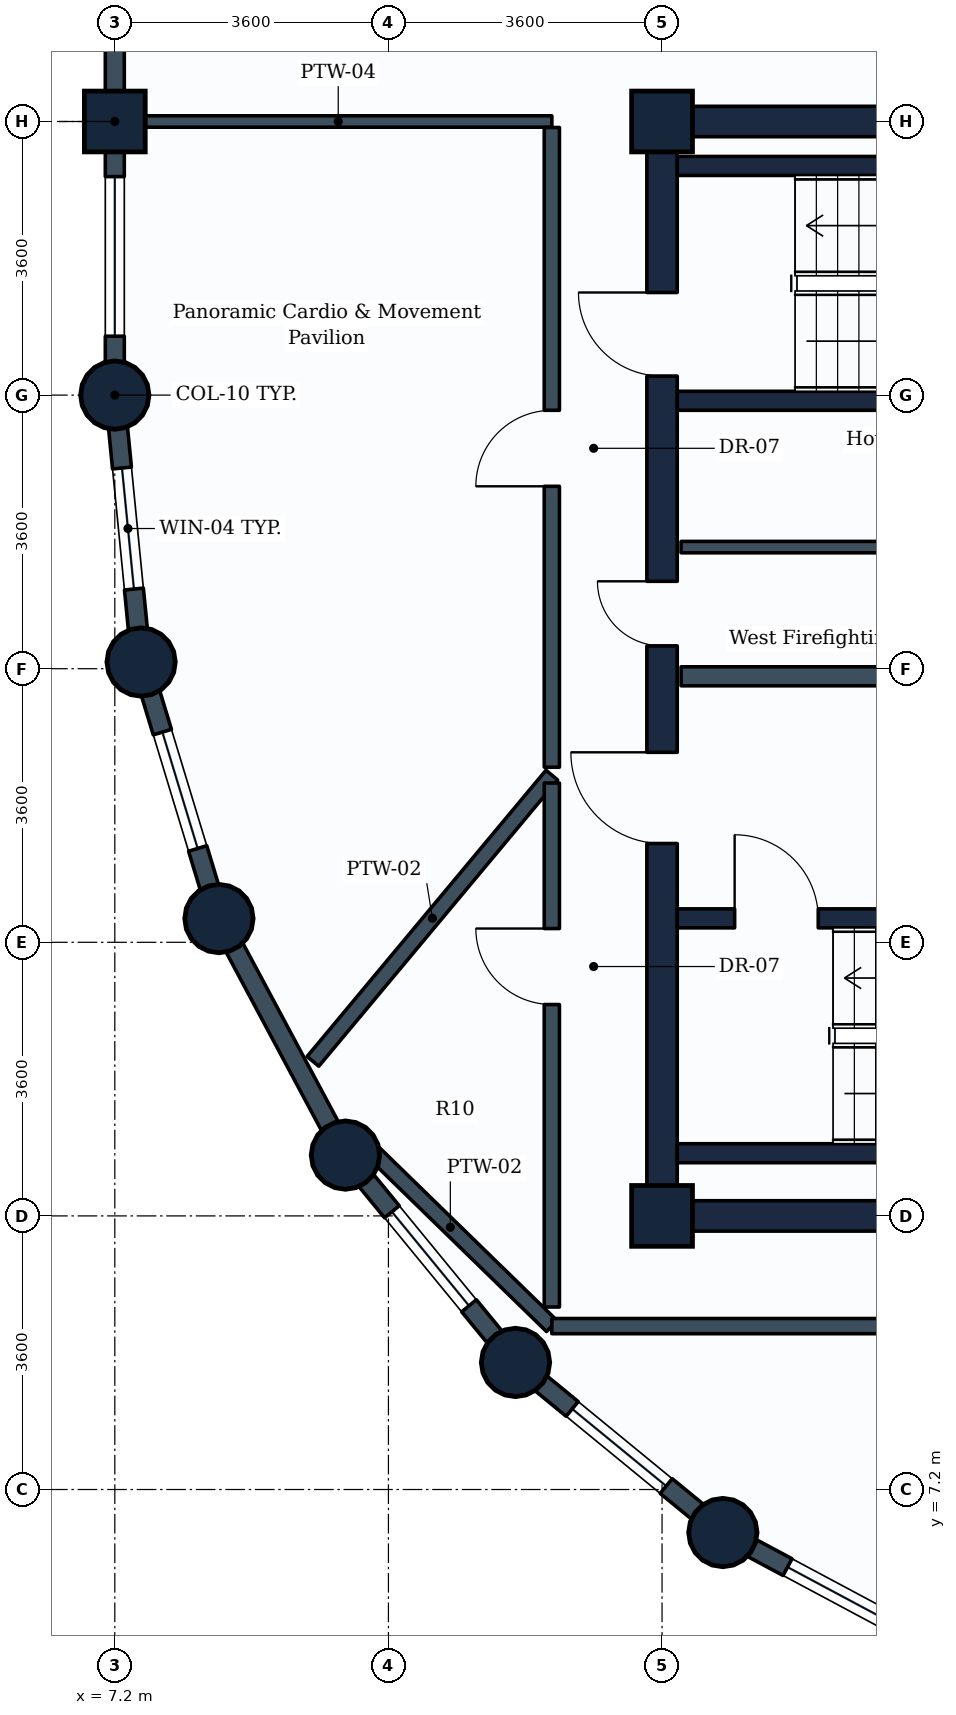
"""IFC4 building model, lengths in metres.
Left out: names, types, materials, properties, quantities, classifications, styles, units other than length and angle.
Written with IfcOpenShell. Run it as: python <this file> out.ifc"""

import sys

from ifc_helpers import new_model, si_unit, direction, frame, frame_2d, origin, origin_2d, place, context, subcontext, project, spatial, rectangle, circle, extrude, element, fill, save


model = new_model("IFC4")
c1 = context("Model", 3, precision=1e-05, world=origin(), true_north=direction((0.0, 1.0)))
c2 = subcontext(c1, "Body", "Model", "MODEL_VIEW")
j1 = project(units=[si_unit("LENGTHUNIT", "METRE"), si_unit("PLANEANGLEUNIT", "RADIAN")], contexts=[c1])
p1 = place(None, origin())
s1 = spatial("IfcSite", under=j1, at=p1, CompositionType="ELEMENT")
p2 = place(p1, origin())
s2 = spatial("IfcBuilding", under=s1, at=p2, CompositionType="ELEMENT")
p3 = place(p2, frame((0.0, 0.0, 255.8)))
s3 = spatial("IfcBuildingStorey", under=s2, at=p3, CompositionType="ELEMENT", Elevation=255.8)
p4 = place(p3, frame((7.2, 21.6, 0.0), z_axis=(0.0, 0.0, 1.0), x_axis=(1.0, 0.0, 0.0)))
e1 = element("IfcColumn", 1, at=p4, inside=s3, PredefinedType="COLUMN", context=c2, shape_type="SweptSolid", body=[
    extrude(circle(Radius=0.45, at=origin_2d()), origin(), (0.0, 0.0, 1.0), 3.6),
])
p5 = place(p3, frame((7.2, 25.2, 0.0), z_axis=(0.0, 0.0, 1.0), x_axis=(0.0, 1.0, 0.0)))
e2 = element("IfcColumn", 2, at=p5, inside=s3, PredefinedType="COLUMN", context=c2, shape_type="SweptSolid", body=[
    extrude(rectangle(XDim=0.8, YDim=0.8, at=origin_2d()), origin(), (0.0, 0.0, 1.0), 3.6),
])
for number, where, z_axis, x_axis in (
    (3, (7.546, 18.088, 0.0), (0.0, 0.0, 1.0), (1.0, 0.0, 0.0)),
    (4, (8.57, 14.712, 0.0), (0.0, 0.0, 1.0), (1.0, 0.0, 0.0)),
    (5, (10.234, 11.6, 0.0), (0.0, 0.0, 1.0), (1.0, 0.0, 0.0)),
    (6, (12.472, 8.872, 0.0), (0.0, 0.0, 1.0), (1.0, 0.0, 0.0)),
):
    element("IfcColumn", number, at=place(p3, frame(where, z_axis=z_axis, x_axis=x_axis)), inside=s3, PredefinedType="COLUMN", context=c2, shape_type="SweptSolid", body=[
        extrude(circle(Radius=0.45, at=origin_2d()), origin(), (0.0, 0.0, 1.0), 3.6),
    ])
for number, where, z_axis, x_axis in (
    (7, (14.4, 10.8, 0.0), (0.0, 0.0, 1.0), (1.0, 0.0, 0.0)),
    (8, (14.4, 25.2, 0.0), (0.0, 0.0, 1.0), (1.0, 0.0, 0.0)),
):
    element("IfcColumn", number, at=place(p3, frame(where, z_axis=z_axis, x_axis=x_axis)), inside=s3, PredefinedType="COLUMN", context=c2, shape_type="SweptSolid", body=[
        extrude(rectangle(XDim=0.8, YDim=0.8, at=origin_2d()), origin(), (0.0, 0.0, 1.0), 3.6),
    ])
p6 = place(p3, frame((15.2, 6.634, 0.0), z_axis=(0.0, 0.0, 1.0), x_axis=(1.0, 0.0, 0.0)))
e9 = element("IfcColumn", 9, at=p6, inside=s3, PredefinedType="COLUMN", context=c2, shape_type="SweptSolid", body=[
    extrude(circle(Radius=0.45, at=origin_2d()), origin(), (0.0, 0.0, 1.0), 3.6),
])
p7 = place(p3, frame((7.2, 25.2, 0.0), z_axis=(0.0, 0.0, 1.0), x_axis=(0.0, 1.0, 0.0)))
e10 = element("IfcWall", 10, at=p7, inside=s3, PredefinedType="STANDARD", context=c2, shape_type="SweptSolid", body=[
    extrude(rectangle(XDim=3.6, YDim=0.25, at=frame_2d((1.8, 0.0))), origin(), (0.0, 0.0, 1.0), 2.83),
])
p8 = place(p3, frame((7.2, 21.6, 0.0), z_axis=(0.0, 0.0, 1.0), x_axis=(0.0, 1.0, 0.0)))
e11 = element("IfcWall", 11, at=p8, inside=s3, PredefinedType="STANDARD", context=c2, shape_type="SweptSolid", body=[
    extrude(rectangle(XDim=3.6, YDim=0.25, at=frame_2d((1.8, 0.0))), origin(), (0.0, 0.0, 1.0), 2.83),
])
p9 = place(p8, frame((0.775, 0.0, 0.85)))
e12 = element("IfcOpeningElement", 12, at=p9, cuts=e11, PredefinedType="OPENING", context=c2, shape_type="SweptSolid", body=[
    extrude(rectangle(XDim=2.1, YDim=1.35, at=frame_2d((1.05, 0.675))), frame((0.0, 0.135, 0.0), z_axis=(0.0, -1.0, 0.0), x_axis=(1.0, 0.0, 0.0)), (0.0, 0.0, 1.0), 0.27),
])
p10 = place(p3, frame((7.546, 18.088, 0.0), z_axis=(0.0, 0.0, 1.0), x_axis=(-0.09802417461, 0.995184033831, 0.0)))
e13 = element("IfcWall", 13, at=p10, inside=s3, PredefinedType="STANDARD", context=c2, shape_type="SweptSolid", body=[
    extrude(rectangle(XDim=3.529, YDim=0.25, at=frame_2d((1.765, 0.0))), origin(), (0.0, 0.0, 1.0), 2.83),
])
p11 = place(p10, frame((0.965, 0.0, 0.85)))
e14 = element("IfcOpeningElement", 14, at=p11, cuts=e13, PredefinedType="OPENING", context=c2, shape_type="SweptSolid", body=[
    extrude(rectangle(XDim=1.6, YDim=1.35, at=frame_2d((0.8, 0.675))), frame((0.0, 0.135, 0.0), z_axis=(0.0, -1.0, 0.0), x_axis=(1.0, 0.0, 0.0)), (0.0, 0.0, 1.0), 0.27),
])
p12 = place(p3, frame((8.57, 14.712, 0.0), z_axis=(0.0, 0.0, 1.0), x_axis=(-0.290305086481, 0.956934144423, 0.0)))
e15 = element("IfcWall", 15, at=p12, inside=s3, PredefinedType="STANDARD", context=c2, shape_type="SweptSolid", body=[
    extrude(rectangle(XDim=3.528, YDim=0.25, at=frame_2d((1.764, 0.0))), origin(), (0.0, 0.0, 1.0), 2.83),
])
p13 = place(p12, frame((0.964, 0.0, 0.85)))
e16 = element("IfcOpeningElement", 16, at=p13, cuts=e15, PredefinedType="OPENING", context=c2, shape_type="SweptSolid", body=[
    extrude(rectangle(XDim=1.6, YDim=1.35, at=frame_2d((0.8, 0.675))), frame((0.0, 0.135, 0.0), z_axis=(0.0, -1.0, 0.0), x_axis=(1.0, 0.0, 0.0)), (0.0, 0.0, 1.0), 0.27),
])
p14 = place(p3, frame((10.234, 11.6, 0.0), z_axis=(0.0, 0.0, 1.0), x_axis=(-0.47151087309, 0.881860247748, 0.0)))
e17 = element("IfcWall", 17, at=p14, inside=s3, PredefinedType="STANDARD", context=c2, shape_type="SweptSolid", body=[
    extrude(rectangle(XDim=3.529, YDim=0.25, at=frame_2d((1.764, 0.0))), origin(), (0.0, 0.0, 1.0), 2.83),
])
p15 = place(p3, frame((12.472, 8.872, 0.0), z_axis=(0.0, 0.0, 1.0), x_axis=(-0.634258295121, 0.773121216285, 0.0)))
e18 = element("IfcWall", 18, at=p15, inside=s3, PredefinedType="STANDARD", context=c2, shape_type="SweptSolid", body=[
    extrude(rectangle(XDim=3.529, YDim=0.25, at=frame_2d((1.764, 0.0))), origin(), (0.0, 0.0, 1.0), 2.83),
])
p16 = place(p15, frame((0.964, 0.0, 0.85)))
e19 = element("IfcOpeningElement", 19, at=p16, cuts=e18, PredefinedType="OPENING", context=c2, shape_type="SweptSolid", body=[
    extrude(rectangle(XDim=1.6, YDim=1.35, at=frame_2d((0.8, 0.675))), frame((0.0, 0.135, 0.0), z_axis=(0.0, -1.0, 0.0), x_axis=(1.0, 0.0, 0.0)), (0.0, 0.0, 1.0), 0.27),
])
p17 = place(p3, frame((15.2, 6.634, 0.0), z_axis=(0.0, 0.0, 1.0), x_axis=(-0.773121216285, 0.634258295121, 0.0)))
e20 = element("IfcWall", 20, at=p17, inside=s3, PredefinedType="STANDARD", context=c2, shape_type="SweptSolid", body=[
    extrude(rectangle(XDim=3.529, YDim=0.25, at=frame_2d((1.764, 0.0))), origin(), (0.0, 0.0, 1.0), 2.83),
])
p18 = place(p17, frame((0.964, 0.0, 0.85)))
e21 = element("IfcOpeningElement", 21, at=p18, cuts=e20, PredefinedType="OPENING", context=c2, shape_type="SweptSolid", body=[
    extrude(rectangle(XDim=1.6, YDim=1.35, at=frame_2d((0.8, 0.675))), frame((0.0, 0.135, 0.0), z_axis=(0.0, -1.0, 0.0), x_axis=(1.0, 0.0, 0.0)), (0.0, 0.0, 1.0), 0.27),
])
p19 = place(p3, frame((18.312, 4.97, 0.0), z_axis=(0.0, 0.0, 1.0), x_axis=(-0.881846862014, 0.471535907389, 0.0)))
e22 = element("IfcWall", 22, at=p19, inside=s3, PredefinedType="STANDARD", context=c2, shape_type="SweptSolid", body=[
    extrude(rectangle(XDim=3.529, YDim=0.25, at=frame_2d((1.765, 0.0))), origin(), (0.0, 0.0, 1.0), 2.83),
])
p20 = place(p19, frame((0.964, 0.0, 0.85)))
e23 = element("IfcOpeningElement", 23, at=p20, cuts=e22, PredefinedType="OPENING", context=c2, shape_type="SweptSolid", body=[
    extrude(rectangle(XDim=1.6, YDim=1.35, at=frame_2d((0.8, 0.675))), frame((0.0, 0.135, 0.0), z_axis=(0.0, -1.0, 0.0), x_axis=(1.0, 0.0, 0.0)), (0.0, 0.0, 1.0), 0.27),
])
p21 = place(p3, frame((14.4, 10.8, 0.0), z_axis=(0.0, 0.0, 1.0), x_axis=(1.0, 0.0, 0.0)))
e24 = element("IfcWall", 24, at=p21, inside=s3, PredefinedType="SHEAR", context=c2, shape_type="SweptSolid", body=[
    extrude(rectangle(XDim=18.0, YDim=0.4, at=frame_2d((9.0, 0.0))), origin(), (0.0, 0.0, 1.0), 3.35),
])
p22 = place(p3, frame((14.4, 25.2, 0.0), z_axis=(0.0, 0.0, 1.0), x_axis=(1.0, 0.0, 0.0)))
e25 = element("IfcWall", 25, at=p22, inside=s3, PredefinedType="SHEAR", context=c2, shape_type="SweptSolid", body=[
    extrude(rectangle(XDim=10.8, YDim=0.4, at=frame_2d((5.4, 0.0))), origin(), (0.0, 0.0, 1.0), 3.35),
])
p23 = place(p3, frame((14.4, 10.8, 0.0), z_axis=(0.0, 0.0, 1.0), x_axis=(0.0, 1.0, 0.0)))
e26 = element("IfcWall", 26, at=p23, inside=s3, PredefinedType="SHEAR", context=c2, shape_type="SweptSolid", body=[
    extrude(rectangle(XDim=14.4, YDim=0.4, at=frame_2d((7.2, 0.0))), origin(), (0.0, 0.0, 1.0), 3.35),
])
p24 = place(p23, frame((11.05, 0.0, 0.0)))
e27 = element("IfcOpeningElement", 27, at=p24, cuts=e26, PredefinedType="OPENING", context=c2, shape_type="SweptSolid", body=[
    extrude(rectangle(XDim=1.1, YDim=2.1, at=frame_2d((0.55, 1.05))), frame((0.0, 0.21, 0.0), z_axis=(0.0, -1.0, 0.0), x_axis=(1.0, 0.0, 0.0)), (0.0, 0.0, 1.0), 0.42),
])
p25 = place(p23, frame((4.9, 0.0, 0.0)))
e28 = element("IfcOpeningElement", 28, at=p25, cuts=e26, PredefinedType="OPENING", context=c2, shape_type="SweptSolid", body=[
    extrude(rectangle(XDim=1.2, YDim=2.1, at=frame_2d((0.6, 1.05))), frame((0.0, 0.21, 0.0), z_axis=(0.0, -1.0, 0.0), x_axis=(1.0, 0.0, 0.0)), (0.0, 0.0, 1.0), 0.42),
])
p26 = place(p23, frame((7.5, 0.0, 0.0)))
e29 = element("IfcOpeningElement", 29, at=p26, cuts=e26, PredefinedType="OPENING", context=c2, shape_type="SweptSolid", body=[
    extrude(rectangle(XDim=0.85, YDim=2.1, at=frame_2d((0.425, 1.05))), frame((0.0, 0.21, 0.0), z_axis=(0.0, -1.0, 0.0), x_axis=(1.0, 0.0, 0.0)), (0.0, 0.0, 1.0), 0.42),
])
p27 = place(p3, frame((14.6, 11.625, 0.0), z_axis=(0.0, 0.0, 1.0), x_axis=(1.0, 0.0, 0.0)))
e30 = element("IfcWall", 30, at=p27, inside=s3, PredefinedType="SHEAR", context=c2, shape_type="SweptSolid", body=[
    extrude(rectangle(XDim=8.75, YDim=0.25, at=frame_2d((4.375, 0.0))), origin(), (0.0, 0.0, 1.0), 3.35),
])
p28 = place(p3, frame((14.6, 14.715, 0.0), z_axis=(0.0, 0.0, 1.0), x_axis=(1.0, 0.0, 0.0)))
e31 = element("IfcWall", 31, at=p28, inside=s3, PredefinedType="SHEAR", context=c2, shape_type="SweptSolid", body=[
    extrude(rectangle(XDim=8.75, YDim=0.25, at=frame_2d((4.375, 0.0))), origin(), (0.0, 0.0, 1.0), 3.35),
])
p29 = place(p28, frame((0.755, 0.0, 0.0)))
e32 = element("IfcOpeningElement", 32, at=p29, cuts=e31, PredefinedType="OPENING", context=c2, shape_type="SweptSolid", body=[
    extrude(rectangle(XDim=1.1, YDim=2.1, at=frame_2d((0.55, 1.05))), frame((0.0, 0.135, 0.0), z_axis=(0.0, -1.0, 0.0), x_axis=(1.0, 0.0, 0.0)), (0.0, 0.0, 1.0), 0.27),
])
for number, where, z_axis, x_axis in (
    (33, (14.6, 21.525, 0.0), (0.0, 0.0, 1.0), (1.0, 0.0, 0.0)),
    (34, (14.6, 24.615, 0.0), (0.0, 0.0, 1.0), (1.0, 0.0, 0.0)),
):
    element("IfcWall", number, at=place(p3, frame(where, z_axis=z_axis, x_axis=x_axis)), inside=s3, PredefinedType="SHEAR", context=c2, shape_type="SweptSolid", body=[
        extrude(rectangle(XDim=8.3, YDim=0.25, at=frame_2d((4.15, 0.0))), origin(), (0.0, 0.0, 1.0), 3.35),
    ])
p30 = place(p3, frame((14.65, 17.9, 0.0), z_axis=(0.0, 0.0, 1.0), x_axis=(1.0, 0.0, 0.0)))
e35 = element("IfcWall", 35, at=p30, inside=s3, PredefinedType="PARTITIONING", context=c2, shape_type="SweptSolid", body=[
    extrude(rectangle(XDim=7.15, YDim=0.25, at=frame_2d((3.575, 0.0))), origin(), (0.0, 0.0, 1.0), 3.335),
])
p31 = place(p3, frame((14.65, 19.6, 0.0), z_axis=(0.0, 0.0, 1.0), x_axis=(1.0, 0.0, 0.0)))
e36 = element("IfcWall", 36, at=p31, inside=s3, PredefinedType="PARTITIONING", context=c2, shape_type="SweptSolid", body=[
    extrude(rectangle(XDim=10.13, YDim=0.15, at=frame_2d((5.065, 0.0))), origin(), (0.0, 0.0, 1.0), 3.335),
])
p32 = place(p3, frame((7.329, 25.2, 0.0), z_axis=(0.0, 0.0, 1.0), x_axis=(1.0, 0.0, 0.0)))
e37 = element("IfcWall", 37, at=p32, inside=s3, PredefinedType="PARTITIONING", context=c2, shape_type="SweptSolid", body=[
    extrude(rectangle(XDim=5.621, YDim=0.15, at=frame_2d((2.811, 0.0))), origin(), (0.0, 0.0, 1.0), 3.335),
])
p33 = place(p3, frame((12.95, 9.35, 0.0), z_axis=(0.0, 0.0, 1.0), x_axis=(-0.716473772124, 0.697614029287, 0.0)))
e38 = element("IfcWall", 38, at=p33, inside=s3, PredefinedType="PARTITIONING", context=c2, shape_type="SweptSolid", body=[
    extrude(rectangle(XDim=3.728, YDim=0.2, at=frame_2d((1.864, 0.0))), origin(), (0.0, 0.0, 1.0), 2.83),
])
p34 = place(p3, frame((12.95, 16.6, 0.0), z_axis=(0.0, 0.0, 1.0), x_axis=(-0.640693345459, -0.767796872281, 0.0)))
e39 = element("IfcWall", 39, at=p34, inside=s3, PredefinedType="PARTITIONING", context=c2, shape_type="SweptSolid", body=[
    extrude(rectangle(XDim=4.906, YDim=0.2, at=frame_2d((2.453, 0.0))), origin(), (0.0, 0.0, 1.0), 2.83),
])
p35 = place(p3, frame((12.95, 16.704, 0.0), z_axis=(0.0, 0.0, 1.0), x_axis=(0.0, 1.0, 0.0)))
e40 = element("IfcWall", 40, at=p35, inside=s3, PredefinedType="PARTITIONING", context=c2, shape_type="SweptSolid", body=[
    extrude(rectangle(XDim=8.417, YDim=0.2, at=frame_2d((4.208, 0.0))), origin(), (0.0, 0.0, 1.0), 3.02),
])
p36 = place(p35, frame((3.696, 0.0, 0.0)))
e41 = element("IfcOpeningElement", 41, at=p36, cuts=e40, PredefinedType="OPENING", context=c2, shape_type="SweptSolid", body=[
    extrude(rectangle(XDim=1.0, YDim=2.1, at=frame_2d((0.5, 1.05))), frame((0.0, 0.11, 0.0), z_axis=(0.0, -1.0, 0.0), x_axis=(1.0, 0.0, 0.0)), (0.0, 0.0, 1.0), 0.22),
])
p37 = place(p3, frame((12.95, 9.601, 0.0), z_axis=(0.0, 0.0, 1.0), x_axis=(0.0, 1.0, 0.0)))
e42 = element("IfcWall", 42, at=p37, inside=s3, PredefinedType="PARTITIONING", context=c2, shape_type="SweptSolid", body=[
    extrude(rectangle(XDim=6.895, YDim=0.2, at=frame_2d((3.447, 0.0))), origin(), (0.0, 0.0, 1.0), 3.03),
])
p38 = place(p37, frame((3.98, 0.0, 0.0)))
e43 = element("IfcOpeningElement", 43, at=p38, cuts=e42, PredefinedType="OPENING", context=c2, shape_type="SweptSolid", body=[
    extrude(rectangle(XDim=1.0, YDim=2.1, at=frame_2d((0.5, 1.05))), frame((0.0, 0.11, 0.0), z_axis=(0.0, -1.0, 0.0), x_axis=(1.0, 0.0, 0.0)), (0.0, 0.0, 1.0), 0.22),
])
p39 = place(p3, frame((12.95, 9.35, 0.0), z_axis=(0.0, 0.0, 1.0), x_axis=(1.0, 0.0, 0.0)))
e44 = element("IfcWall", 44, at=p39, inside=s3, PredefinedType="PARTITIONING", context=c2, shape_type="SweptSolid", body=[
    extrude(rectangle(XDim=15.771, YDim=0.2, at=frame_2d((7.885, 0.0))), origin(), (0.0, 0.0, 1.0), 3.02),
])
p40 = place(p39, frame((4.836, 0.0, 0.0)))
e45 = element("IfcOpeningElement", 45, at=p40, cuts=e44, PredefinedType="OPENING", context=c2, shape_type="SweptSolid", body=[
    extrude(rectangle(XDim=1.0, YDim=2.1, at=frame_2d((0.5, 1.05))), frame((0.0, 0.11, 0.0), z_axis=(0.0, -1.0, 0.0), x_axis=(1.0, 0.0, 0.0)), (0.0, 0.0, 1.0), 0.22),
])
p41 = place(p9, origin())
e46 = element("IfcWindow", 46, at=p41, inside=s3, PartitioningType="SINGLE_PANEL", PredefinedType="WINDOW", context=c2, shape_type="SweptSolid", body=[
    extrude(rectangle(XDim=2.1, YDim=1.35, at=frame_2d((1.05, 0.675))), frame((0.0, 0.03, 0.0), z_axis=(0.0, -1.0, 0.0), x_axis=(1.0, 0.0, 0.0)), (0.0, 0.0, 1.0), 0.06),
])
fill(e12, e46)
p42 = place(p11, origin())
e47 = element("IfcWindow", 47, at=p42, inside=s3, PartitioningType="SINGLE_PANEL", PredefinedType="WINDOW", context=c2, shape_type="SweptSolid", body=[
    extrude(rectangle(XDim=1.6, YDim=1.35, at=frame_2d((0.8, 0.675))), frame((0.0, 0.03, 0.0), z_axis=(0.0, -1.0, 0.0), x_axis=(1.0, 0.0, 0.0)), (0.0, 0.0, 1.0), 0.06),
])
fill(e14, e47)
p43 = place(p13, origin())
e48 = element("IfcWindow", 48, at=p43, inside=s3, PartitioningType="SINGLE_PANEL", PredefinedType="WINDOW", context=c2, shape_type="SweptSolid", body=[
    extrude(rectangle(XDim=1.6, YDim=1.35, at=frame_2d((0.8, 0.675))), frame((0.0, 0.03, 0.0), z_axis=(0.0, -1.0, 0.0), x_axis=(1.0, 0.0, 0.0)), (0.0, 0.0, 1.0), 0.06),
])
fill(e16, e48)
p44 = place(p16, origin())
e49 = element("IfcWindow", 49, at=p44, inside=s3, PartitioningType="SINGLE_PANEL", PredefinedType="WINDOW", context=c2, shape_type="SweptSolid", body=[
    extrude(rectangle(XDim=1.6, YDim=1.35, at=frame_2d((0.8, 0.675))), frame((0.0, 0.03, 0.0), z_axis=(0.0, -1.0, 0.0), x_axis=(1.0, 0.0, 0.0)), (0.0, 0.0, 1.0), 0.06),
])
fill(e19, e49)
p45 = place(p18, origin())
e50 = element("IfcWindow", 50, at=p45, inside=s3, PartitioningType="SINGLE_PANEL", PredefinedType="WINDOW", context=c2, shape_type="SweptSolid", body=[
    extrude(rectangle(XDim=1.6, YDim=1.35, at=frame_2d((0.8, 0.675))), frame((0.0, 0.03, 0.0), z_axis=(0.0, -1.0, 0.0), x_axis=(1.0, 0.0, 0.0)), (0.0, 0.0, 1.0), 0.06),
])
fill(e21, e50)
p46 = place(p20, origin())
e51 = element("IfcWindow", 51, at=p46, inside=s3, PartitioningType="SINGLE_PANEL", PredefinedType="WINDOW", context=c2, shape_type="SweptSolid", body=[
    extrude(rectangle(XDim=1.6, YDim=1.35, at=frame_2d((0.8, 0.675))), frame((0.0, 0.03, 0.0), z_axis=(0.0, -1.0, 0.0), x_axis=(1.0, 0.0, 0.0)), (0.0, 0.0, 1.0), 0.06),
])
fill(e23, e51)
p47 = place(p29, origin())
e52 = element("IfcDoor", 52, at=p47, inside=s3, OperationType="SINGLE_SWING_LEFT", PredefinedType="DOOR", context=c2, shape_type="SweptSolid", body=[
    extrude(rectangle(XDim=1.1, YDim=2.1, at=frame_2d((0.55, 1.05))), frame((0.0, 0.025, 0.0), z_axis=(0.0, -1.0, 0.0), x_axis=(1.0, 0.0, 0.0)), (0.0, 0.0, 1.0), 0.05),
])
fill(e32, e52)
p48 = place(p24, origin())
e53 = element("IfcDoor", 53, at=p48, inside=s3, OperationType="SINGLE_SWING_RIGHT", PredefinedType="DOOR", context=c2, shape_type="SweptSolid", body=[
    extrude(rectangle(XDim=1.1, YDim=2.1, at=frame_2d((0.55, 1.05))), frame((0.0, 0.025, 0.0), z_axis=(0.0, -1.0, 0.0), x_axis=(1.0, 0.0, 0.0)), (0.0, 0.0, 1.0), 0.05),
])
fill(e27, e53)
p49 = place(p25, origin())
e54 = element("IfcDoor", 54, at=p49, inside=s3, OperationType="SINGLE_SWING_RIGHT", PredefinedType="DOOR", context=c2, shape_type="SweptSolid", body=[
    extrude(rectangle(XDim=1.2, YDim=2.1, at=frame_2d((0.6, 1.05))), frame((0.0, 0.025, 0.0), z_axis=(0.0, -1.0, 0.0), x_axis=(1.0, 0.0, 0.0)), (0.0, 0.0, 1.0), 0.05),
])
fill(e28, e54)
p50 = place(p26, origin())
e55 = element("IfcDoor", 55, at=p50, inside=s3, OperationType="SINGLE_SWING_RIGHT", PredefinedType="DOOR", context=c2, shape_type="SweptSolid", body=[
    extrude(rectangle(XDim=0.85, YDim=2.1, at=frame_2d((0.425, 1.05))), frame((0.0, 0.025, 0.0), z_axis=(0.0, -1.0, 0.0), x_axis=(1.0, 0.0, 0.0)), (0.0, 0.0, 1.0), 0.05),
])
fill(e29, e55)
p51 = place(p36, origin())
e56 = element("IfcDoor", 56, at=p51, inside=s3, OperationType="SINGLE_SWING_LEFT", PredefinedType="DOOR", context=c2, shape_type="SweptSolid", body=[
    extrude(rectangle(XDim=1.0, YDim=2.1, at=frame_2d((0.5, 1.05))), frame((0.0, 0.025, 0.0), z_axis=(0.0, -1.0, 0.0), x_axis=(1.0, 0.0, 0.0)), (0.0, 0.0, 1.0), 0.05),
])
fill(e41, e56)
p52 = place(p38, origin())
e57 = element("IfcDoor", 57, at=p52, inside=s3, OperationType="SINGLE_SWING_RIGHT", PredefinedType="DOOR", context=c2, shape_type="SweptSolid", body=[
    extrude(rectangle(XDim=1.0, YDim=2.1, at=frame_2d((0.5, 1.05))), frame((0.0, 0.025, 0.0), z_axis=(0.0, -1.0, 0.0), x_axis=(1.0, 0.0, 0.0)), (0.0, 0.0, 1.0), 0.05),
])
fill(e43, e57)
save(model, sys.argv[1])
